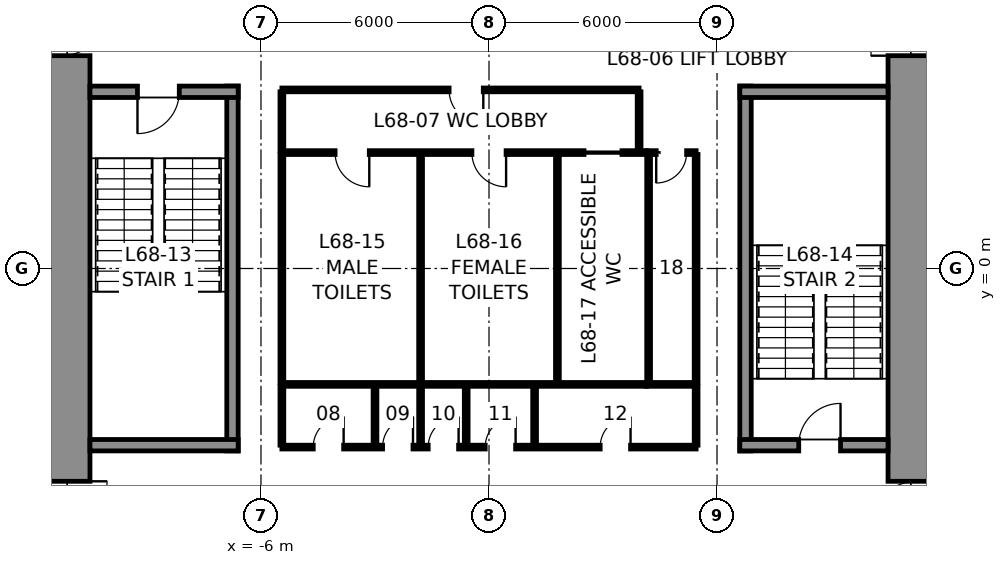
"""IFC4 building model, lengths in metres.
Left out: names, types, materials, properties, quantities, classifications, styles, units other than length and angle.
Written with IfcOpenShell. Run it as: python <this file> out.ifc"""

import sys

from ifc_helpers import new_model, si_unit, direction, frame, frame_2d, origin, place, context, subcontext, project, spatial, rectangle, extrude, element, fill, save


model = new_model("IFC4")
c1 = context("Model", 3, precision=1e-05, world=origin(), true_north=direction((0.0, 1.0)))
c2 = subcontext(c1, "Body", "Model", "MODEL_VIEW")
j1 = project(units=[si_unit("LENGTHUNIT", "METRE"), si_unit("PLANEANGLEUNIT", "RADIAN")], contexts=[c1])
p1 = place(None, origin())
s1 = spatial("IfcSite", under=j1, at=p1, CompositionType="ELEMENT")
p2 = place(p1, origin())
s2 = spatial("IfcBuilding", under=s1, at=p2, CompositionType="ELEMENT")
p3 = place(p2, frame((0.0, 0.0, 302.8)))
s3 = spatial("IfcBuildingStorey", under=s2, at=p3, CompositionType="ELEMENT", Elevation=302.8)
p4 = place(p3, frame((11.25, 10.5, 0.0), z_axis=(0.0, 0.0, 1.0), x_axis=(0.0, -1.0, 0.0)))
e1 = element("IfcWall", 1, at=p4, inside=s3, PredefinedType="SHEAR", context=c2, shape_type="SweptSolid", body=[
    extrude(rectangle(XDim=21.0, YDim=1.5, at=frame_2d((10.5, 0.0))), origin(), (0.0, 0.0, 1.0), 5.0),
])
p5 = place(p4, frame((3.7, 0.0, 0.0)))
e2 = element("IfcOpeningElement", 2, at=p5, cuts=e1, PredefinedType="OPENING", context=c2, shape_type="SweptSolid", body=[
    extrude(rectangle(XDim=1.2, YDim=2.3, at=frame_2d((0.6, 1.15))), frame((0.0, 0.76, 0.0), z_axis=(0.0, -1.0, 0.0), x_axis=(1.0, 0.0, 0.0)), (0.0, 0.0, 1.0), 1.52),
])
p6 = place(p4, frame((16.1, 0.0, 0.0)))
e3 = element("IfcOpeningElement", 3, at=p6, cuts=e1, PredefinedType="OPENING", context=c2, shape_type="SweptSolid", body=[
    extrude(rectangle(XDim=1.2, YDim=2.3, at=frame_2d((0.6, 1.15))), frame((0.0, 0.76, 0.0), z_axis=(0.0, -1.0, 0.0), x_axis=(1.0, 0.0, 0.0)), (0.0, 0.0, 1.0), 1.52),
])
p7 = place(p3, frame((-11.25, -10.5, 0.0), z_axis=(0.0, 0.0, 1.0), x_axis=(0.0, 1.0, 0.0)))
e4 = element("IfcWall", 4, at=p7, inside=s3, PredefinedType="SHEAR", context=c2, shape_type="SweptSolid", body=[
    extrude(rectangle(XDim=21.0, YDim=1.5, at=frame_2d((10.5, 0.0))), origin(), (0.0, 0.0, 1.0), 5.0),
])
p8 = place(p7, frame((16.1, 0.0, 0.0)))
e5 = element("IfcOpeningElement", 5, at=p8, cuts=e4, PredefinedType="OPENING", context=c2, shape_type="SweptSolid", body=[
    extrude(rectangle(XDim=1.2, YDim=2.3, at=frame_2d((0.6, 1.15))), frame((0.0, 0.76, 0.0), z_axis=(0.0, -1.0, 0.0), x_axis=(1.0, 0.0, 0.0)), (0.0, 0.0, 1.0), 1.52),
])
p9 = place(p7, frame((3.7, 0.0, 0.0)))
e6 = element("IfcOpeningElement", 6, at=p9, cuts=e4, PredefinedType="OPENING", context=c2, shape_type="SweptSolid", body=[
    extrude(rectangle(XDim=1.2, YDim=2.3, at=frame_2d((0.6, 1.15))), frame((0.0, 0.76, 0.0), z_axis=(0.0, -1.0, 0.0), x_axis=(1.0, 0.0, 0.0)), (0.0, 0.0, 1.0), 1.52),
])
p10 = place(p3, frame((-6.75, -4.8, 0.0), z_axis=(0.0, 0.0, 1.0), x_axis=(0.0, 1.0, 0.0)))
e7 = element("IfcWall", 7, at=p10, inside=s3, PredefinedType="SOLIDWALL", context=c2, shape_type="SweptSolid", body=[
    extrude(rectangle(XDim=9.6, YDim=0.3, at=frame_2d((4.8, 0.0))), origin(), (0.0, 0.0, 1.0), 4.75),
])
p11 = place(p3, frame((-10.5, 4.65, 0.0), z_axis=(0.0, 0.0, 1.0), x_axis=(1.0, 0.0, 0.0)))
e8 = element("IfcWall", 8, at=p11, inside=s3, PredefinedType="SOLIDWALL", context=c2, shape_type="SweptSolid", body=[
    extrude(rectangle(XDim=3.9, YDim=0.3, at=frame_2d((1.95, 0.0))), origin(), (0.0, 0.0, 1.0), 4.75),
])
p12 = place(p11, frame((1.25, 0.0, 0.0)))
e9 = element("IfcOpeningElement", 9, at=p12, cuts=e8, PredefinedType="OPENING", context=c2, shape_type="SweptSolid", body=[
    extrude(rectangle(XDim=1.1, YDim=2.3, at=frame_2d((0.55, 1.15))), frame((0.0, 0.16, 0.0), z_axis=(0.0, -1.0, 0.0), x_axis=(1.0, 0.0, 0.0)), (0.0, 0.0, 1.0), 0.32),
])
p13 = place(p3, frame((-6.6, -4.65, 0.0), z_axis=(0.0, 0.0, 1.0), x_axis=(-1.0, 0.0, 0.0)))
e10 = element("IfcWall", 10, at=p13, inside=s3, PredefinedType="SOLIDWALL", context=c2, shape_type="SweptSolid", body=[
    extrude(rectangle(XDim=3.9, YDim=0.3, at=frame_2d((1.95, 0.0))), origin(), (0.0, 0.0, 1.0), 4.75),
])
p14 = place(p3, frame((6.75, -4.8, 0.0), z_axis=(0.0, 0.0, 1.0), x_axis=(0.0, 1.0, 0.0)))
e11 = element("IfcWall", 11, at=p14, inside=s3, PredefinedType="SOLIDWALL", context=c2, shape_type="SweptSolid", body=[
    extrude(rectangle(XDim=9.6, YDim=0.3, at=frame_2d((4.8, 0.0))), origin(), (0.0, 0.0, 1.0), 4.75),
])
p15 = place(p3, frame((6.6, 4.65, 0.0), z_axis=(0.0, 0.0, 1.0), x_axis=(1.0, 0.0, 0.0)))
e12 = element("IfcWall", 12, at=p15, inside=s3, PredefinedType="SOLIDWALL", context=c2, shape_type="SweptSolid", body=[
    extrude(rectangle(XDim=3.9, YDim=0.3, at=frame_2d((1.95, 0.0))), origin(), (0.0, 0.0, 1.0), 4.75),
])
p16 = place(p3, frame((10.5, -4.65, 0.0), z_axis=(0.0, 0.0, 1.0), x_axis=(-1.0, 0.0, 0.0)))
e13 = element("IfcWall", 13, at=p16, inside=s3, PredefinedType="SOLIDWALL", context=c2, shape_type="SweptSolid", body=[
    extrude(rectangle(XDim=3.9, YDim=0.3, at=frame_2d((1.95, 0.0))), origin(), (0.0, 0.0, 1.0), 4.75),
])
p17 = place(p16, frame((1.25, 0.0, 0.0)))
e14 = element("IfcOpeningElement", 14, at=p17, cuts=e13, PredefinedType="OPENING", context=c2, shape_type="SweptSolid", body=[
    extrude(rectangle(XDim=1.1, YDim=2.3, at=frame_2d((0.55, 1.15))), frame((0.0, 0.16, 0.0), z_axis=(0.0, -1.0, 0.0), x_axis=(1.0, 0.0, 0.0)), (0.0, 0.0, 1.0), 0.32),
])
p18 = place(p3, frame((-5.45, 3.05, 0.0), z_axis=(0.0, 0.0, 1.0), x_axis=(1.0, 0.0, 0.0)))
e15 = element("IfcWall", 15, at=p18, inside=s3, PredefinedType="PARTITIONING", context=c2, shape_type="SweptSolid", body=[
    extrude(rectangle(XDim=9.6, YDim=0.1, at=frame_2d((4.8, 0.0))), origin(), (0.0, 0.0, 1.0), 4.75),
])
p19 = place(p18, frame((1.4, 0.0, 0.0)))
e16 = element("IfcOpeningElement", 16, at=p19, cuts=e15, PredefinedType="OPENING", context=c2, shape_type="SweptSolid", body=[
    extrude(rectangle(XDim=0.9, YDim=2.3, at=frame_2d((0.45, 1.15))), frame((0.0, 0.06, 0.0), z_axis=(0.0, -1.0, 0.0), x_axis=(1.0, 0.0, 0.0)), (0.0, 0.0, 1.0), 0.12),
])
p20 = place(p18, frame((5.0, 0.0, 0.0)))
e17 = element("IfcOpeningElement", 17, at=p20, cuts=e15, PredefinedType="OPENING", context=c2, shape_type="SweptSolid", body=[
    extrude(rectangle(XDim=0.9, YDim=2.3, at=frame_2d((0.45, 1.15))), frame((0.0, 0.06, 0.0), z_axis=(0.0, -1.0, 0.0), x_axis=(1.0, 0.0, 0.0)), (0.0, 0.0, 1.0), 0.12),
])
p21 = place(p18, frame((7.95, 0.0, 0.0)))
e18 = element("IfcOpeningElement", 18, at=p21, cuts=e15, PredefinedType="OPENING", context=c2, shape_type="SweptSolid", body=[
    extrude(rectangle(XDim=1.0, YDim=2.3, at=frame_2d((0.5, 1.15))), frame((0.0, 0.06, 0.0), z_axis=(0.0, -1.0, 0.0), x_axis=(1.0, 0.0, 0.0)), (0.0, 0.0, 1.0), 0.12),
])
p22 = place(p3, frame((4.15, 3.05, 0.0), z_axis=(0.0, 0.0, 1.0), x_axis=(1.0, 0.0, 0.0)))
e19 = element("IfcWall", 19, at=p22, inside=s3, PredefinedType="PARTITIONING", context=c2, shape_type="SweptSolid", body=[
    extrude(rectangle(XDim=1.3, YDim=0.1, at=frame_2d((0.65, 0.0))), origin(), (0.0, 0.0, 1.0), 4.75),
])
p23 = place(p22, frame((0.25, 0.0, 0.0)))
e20 = element("IfcOpeningElement", 20, at=p23, cuts=e19, PredefinedType="OPENING", context=c2, shape_type="SweptSolid", body=[
    extrude(rectangle(XDim=0.8, YDim=2.3, at=frame_2d((0.4, 1.15))), frame((0.0, 0.06, 0.0), z_axis=(0.0, -1.0, 0.0), x_axis=(1.0, 0.0, 0.0)), (0.0, 0.0, 1.0), 0.12),
])
p24 = place(p3, frame((4.15, -3.05, 0.0), z_axis=(0.0, 0.0, 1.0), x_axis=(-1.0, 0.0, 0.0)))
e21 = element("IfcWall", 21, at=p24, inside=s3, PredefinedType="PARTITIONING", context=c2, shape_type="SweptSolid", body=[
    extrude(rectangle(XDim=9.6, YDim=0.1, at=frame_2d((4.8, 0.0))), origin(), (0.0, 0.0, 1.0), 4.75),
])
p25 = place(p3, frame((5.45, -3.05, 0.0), z_axis=(0.0, 0.0, 1.0), x_axis=(-1.0, 0.0, 0.0)))
e22 = element("IfcWall", 22, at=p25, inside=s3, PredefinedType="PARTITIONING", context=c2, shape_type="SweptSolid", body=[
    extrude(rectangle(XDim=1.3, YDim=0.1, at=frame_2d((0.65, 0.0))), origin(), (0.0, 0.0, 1.0), 4.75),
])
for number, where, z_axis, x_axis in (
    (23, (5.45, 3.0, 0.0), (0.0, 0.0, 1.0), (0.0, -1.0, 0.0)),
    (24, (-5.45, -3.0, 0.0), (0.0, 0.0, 1.0), (0.0, 1.0, 0.0)),
    (25, (-1.8, -3.0, 0.0), (0.0, 0.0, 1.0), (0.0, 1.0, 0.0)),
    (26, (1.8, -3.0, 0.0), (0.0, 0.0, 1.0), (0.0, 1.0, 0.0)),
    (27, (4.2, -3.0, 0.0), (0.0, 0.0, 1.0), (0.0, 1.0, 0.0)),
):
    element("IfcWall", number, at=place(p3, frame(where, z_axis=z_axis, x_axis=x_axis)), inside=s3, PredefinedType="PARTITIONING", context=c2, shape_type="SweptSolid", body=[
        extrude(rectangle(XDim=6.0, YDim=0.1, at=frame_2d((3.0, 0.0))), origin(), (0.0, 0.0, 1.0), 4.75),
    ])
p26 = place(p3, frame((-5.45, 4.7, 0.0), z_axis=(0.0, 0.0, 1.0), x_axis=(1.0, 0.0, 0.0)))
e28 = element("IfcWall", 28, at=p26, inside=s3, PredefinedType="PARTITIONING", context=c2, shape_type="SweptSolid", body=[
    extrude(rectangle(XDim=9.4, YDim=0.1, at=frame_2d((4.7, 0.0))), origin(), (0.0, 0.0, 1.0), 4.75),
])
p27 = place(p26, frame((4.4, 0.0, 0.0)))
e29 = element("IfcOpeningElement", 29, at=p27, cuts=e28, PredefinedType="OPENING", context=c2, shape_type="SweptSolid", body=[
    extrude(rectangle(XDim=0.9, YDim=2.3, at=frame_2d((0.45, 1.15))), frame((0.0, 0.06, 0.0), z_axis=(0.0, -1.0, 0.0), x_axis=(1.0, 0.0, 0.0)), (0.0, 0.0, 1.0), 0.12),
])
for number, where, z_axis, x_axis in (
    (30, (-5.45, 3.1, 0.0), (0.0, 0.0, 1.0), (0.0, 1.0, 0.0)),
    (31, (3.95, 3.1, 0.0), (0.0, 0.0, 1.0), (0.0, 1.0, 0.0)),
):
    element("IfcWall", number, at=place(p3, frame(where, z_axis=z_axis, x_axis=x_axis)), inside=s3, PredefinedType="PARTITIONING", context=c2, shape_type="SweptSolid", body=[
        extrude(rectangle(XDim=1.55, YDim=0.1, at=frame_2d((0.775, 0.0))), origin(), (0.0, 0.0, 1.0), 4.75),
    ])
p28 = place(p3, frame((5.45, -4.7, 0.0), z_axis=(0.0, 0.0, 1.0), x_axis=(-1.0, 0.0, 0.0)))
e32 = element("IfcWall", 32, at=p28, inside=s3, PredefinedType="PARTITIONING", context=c2, shape_type="SweptSolid", body=[
    extrude(rectangle(XDim=10.9, YDim=0.1, at=frame_2d((5.45, 0.0))), origin(), (0.0, 0.0, 1.0), 4.75),
])
p29 = place(p28, frame((9.275, 0.0, 0.0)))
e33 = element("IfcOpeningElement", 33, at=p29, cuts=e32, PredefinedType="OPENING", context=c2, shape_type="SweptSolid", body=[
    extrude(rectangle(XDim=0.8, YDim=2.3, at=frame_2d((0.4, 1.15))), frame((0.0, 0.06, 0.0), z_axis=(0.0, -1.0, 0.0), x_axis=(1.0, 0.0, 0.0)), (0.0, 0.0, 1.0), 0.12),
])
p30 = place(p28, frame((7.45, 0.0, 0.0)))
e34 = element("IfcOpeningElement", 34, at=p30, cuts=e32, PredefinedType="OPENING", context=c2, shape_type="SweptSolid", body=[
    extrude(rectangle(XDim=0.8, YDim=2.3, at=frame_2d((0.4, 1.15))), frame((0.0, 0.06, 0.0), z_axis=(0.0, -1.0, 0.0), x_axis=(1.0, 0.0, 0.0)), (0.0, 0.0, 1.0), 0.12),
])
p31 = place(p28, frame((6.25, 0.0, 0.0)))
e35 = element("IfcOpeningElement", 35, at=p31, cuts=e32, PredefinedType="OPENING", context=c2, shape_type="SweptSolid", body=[
    extrude(rectangle(XDim=0.8, YDim=2.3, at=frame_2d((0.4, 1.15))), frame((0.0, 0.06, 0.0), z_axis=(0.0, -1.0, 0.0), x_axis=(1.0, 0.0, 0.0)), (0.0, 0.0, 1.0), 0.12),
])
p32 = place(p28, frame((4.75, 0.0, 0.0)))
e36 = element("IfcOpeningElement", 36, at=p32, cuts=e32, PredefinedType="OPENING", context=c2, shape_type="SweptSolid", body=[
    extrude(rectangle(XDim=0.8, YDim=2.3, at=frame_2d((0.4, 1.15))), frame((0.0, 0.06, 0.0), z_axis=(0.0, -1.0, 0.0), x_axis=(1.0, 0.0, 0.0)), (0.0, 0.0, 1.0), 0.12),
])
p33 = place(p28, frame((1.725, 0.0, 0.0)))
e37 = element("IfcOpeningElement", 37, at=p33, cuts=e32, PredefinedType="OPENING", context=c2, shape_type="SweptSolid", body=[
    extrude(rectangle(XDim=0.8, YDim=2.3, at=frame_2d((0.4, 1.15))), frame((0.0, 0.06, 0.0), z_axis=(0.0, -1.0, 0.0), x_axis=(1.0, 0.0, 0.0)), (0.0, 0.0, 1.0), 0.12),
])
for number, where, z_axis, x_axis in (
    (38, (-5.45, -3.1, 0.0), (0.0, 0.0, 1.0), (0.0, -1.0, 0.0)),
    (39, (5.45, -3.1, 0.0), (0.0, 0.0, 1.0), (0.0, -1.0, 0.0)),
    (40, (-3.0, -3.1, 0.0), (0.0, 0.0, 1.0), (0.0, -1.0, 0.0)),
    (41, (-1.8, -3.1, 0.0), (0.0, 0.0, 1.0), (0.0, -1.0, 0.0)),
    (42, (-0.6, -3.1, 0.0), (0.0, 0.0, 1.0), (0.0, -1.0, 0.0)),
    (43, (1.2, -3.1, 0.0), (0.0, 0.0, 1.0), (0.0, -1.0, 0.0)),
):
    element("IfcWall", number, at=place(p3, frame(where, z_axis=z_axis, x_axis=x_axis)), inside=s3, PredefinedType="PARTITIONING", context=c2, shape_type="SweptSolid", body=[
        extrude(rectangle(XDim=1.55, YDim=0.1, at=frame_2d((0.775, 0.0))), origin(), (0.0, 0.0, 1.0), 4.75),
    ])
p34 = place(p12, frame((1.1, 0.0, 0.0), z_axis=(0.0, 0.0, 1.0), x_axis=(-1.0, 0.0, 0.0)))
e44 = element("IfcDoor", 44, at=p34, inside=s3, OperationType="SINGLE_SWING_RIGHT", PredefinedType="DOOR", context=c2, shape_type="SweptSolid", body=[
    extrude(rectangle(XDim=1.1, YDim=2.3, at=frame_2d((0.55, 1.15))), frame((0.0, 0.025, 0.0), z_axis=(0.0, -1.0, 0.0), x_axis=(1.0, 0.0, 0.0)), (0.0, 0.0, 1.0), 0.05),
])
fill(e9, e44)
p35 = place(p17, frame((1.1, 0.0, 0.0), z_axis=(0.0, 0.0, 1.0), x_axis=(-1.0, 0.0, 0.0)))
e45 = element("IfcDoor", 45, at=p35, inside=s3, OperationType="SINGLE_SWING_RIGHT", PredefinedType="DOOR", context=c2, shape_type="SweptSolid", body=[
    extrude(rectangle(XDim=1.1, YDim=2.3, at=frame_2d((0.55, 1.15))), frame((0.0, 0.025, 0.0), z_axis=(0.0, -1.0, 0.0), x_axis=(1.0, 0.0, 0.0)), (0.0, 0.0, 1.0), 0.05),
])
fill(e14, e45)
p36 = place(p19, frame((0.9, 0.0, 0.0), z_axis=(0.0, 0.0, 1.0), x_axis=(-1.0, 0.0, 0.0)))
e46 = element("IfcDoor", 46, at=p36, inside=s3, OperationType="SINGLE_SWING_LEFT", PredefinedType="DOOR", context=c2, shape_type="SweptSolid", body=[
    extrude(rectangle(XDim=0.9, YDim=2.3, at=frame_2d((0.45, 1.15))), frame((0.0, 0.025, 0.0), z_axis=(0.0, -1.0, 0.0), x_axis=(1.0, 0.0, 0.0)), (0.0, 0.0, 1.0), 0.05),
])
fill(e16, e46)
p37 = place(p20, frame((0.9, 0.0, 0.0), z_axis=(0.0, 0.0, 1.0), x_axis=(-1.0, 0.0, 0.0)))
e47 = element("IfcDoor", 47, at=p37, inside=s3, OperationType="SINGLE_SWING_LEFT", PredefinedType="DOOR", context=c2, shape_type="SweptSolid", body=[
    extrude(rectangle(XDim=0.9, YDim=2.3, at=frame_2d((0.45, 1.15))), frame((0.0, 0.025, 0.0), z_axis=(0.0, -1.0, 0.0), x_axis=(1.0, 0.0, 0.0)), (0.0, 0.0, 1.0), 0.05),
])
fill(e17, e47)
p38 = place(p21, frame((1.0, 0.0, 0.0), z_axis=(0.0, 0.0, 1.0), x_axis=(-1.0, 0.0, 0.0)))
e48 = element("IfcDoor", 48, at=p38, inside=s3, OperationType="SLIDING_TO_LEFT", PredefinedType="DOOR", context=c2, shape_type="SweptSolid", body=[
    extrude(rectangle(XDim=1.0, YDim=2.3, at=frame_2d((0.5, 1.15))), frame((0.0, 0.025, 0.0), z_axis=(0.0, -1.0, 0.0), x_axis=(1.0, 0.0, 0.0)), (0.0, 0.0, 1.0), 0.05),
])
fill(e18, e48)
p39 = place(p23, frame((0.8, 0.0, 0.0), z_axis=(0.0, 0.0, 1.0), x_axis=(-1.0, 0.0, 0.0)))
e49 = element("IfcDoor", 49, at=p39, inside=s3, OperationType="SINGLE_SWING_RIGHT", PredefinedType="DOOR", context=c2, shape_type="SweptSolid", body=[
    extrude(rectangle(XDim=0.8, YDim=2.3, at=frame_2d((0.4, 1.15))), frame((0.0, 0.025, 0.0), z_axis=(0.0, -1.0, 0.0), x_axis=(1.0, 0.0, 0.0)), (0.0, 0.0, 1.0), 0.05),
])
fill(e20, e49)
p40 = place(p27, frame((0.9, 0.0, 0.0), z_axis=(0.0, 0.0, 1.0), x_axis=(-1.0, 0.0, 0.0)))
e50 = element("IfcDoor", 50, at=p40, inside=s3, OperationType="SINGLE_SWING_LEFT", PredefinedType="DOOR", context=c2, shape_type="SweptSolid", body=[
    extrude(rectangle(XDim=0.9, YDim=2.3, at=frame_2d((0.45, 1.15))), frame((0.0, 0.025, 0.0), z_axis=(0.0, -1.0, 0.0), x_axis=(1.0, 0.0, 0.0)), (0.0, 0.0, 1.0), 0.05),
])
fill(e29, e50)
p41 = place(p29, frame((0.8, 0.0, 0.0), z_axis=(0.0, 0.0, 1.0), x_axis=(-1.0, 0.0, 0.0)))
e51 = element("IfcDoor", 51, at=p41, inside=s3, OperationType="SINGLE_SWING_RIGHT", PredefinedType="DOOR", context=c2, shape_type="SweptSolid", body=[
    extrude(rectangle(XDim=0.8, YDim=2.3, at=frame_2d((0.4, 1.15))), frame((0.0, 0.025, 0.0), z_axis=(0.0, -1.0, 0.0), x_axis=(1.0, 0.0, 0.0)), (0.0, 0.0, 1.0), 0.05),
])
fill(e33, e51)
p42 = place(p30, frame((0.8, 0.0, 0.0), z_axis=(0.0, 0.0, 1.0), x_axis=(-1.0, 0.0, 0.0)))
e52 = element("IfcDoor", 52, at=p42, inside=s3, OperationType="SINGLE_SWING_RIGHT", PredefinedType="DOOR", context=c2, shape_type="SweptSolid", body=[
    extrude(rectangle(XDim=0.8, YDim=2.3, at=frame_2d((0.4, 1.15))), frame((0.0, 0.025, 0.0), z_axis=(0.0, -1.0, 0.0), x_axis=(1.0, 0.0, 0.0)), (0.0, 0.0, 1.0), 0.05),
])
fill(e34, e52)
p43 = place(p31, frame((0.8, 0.0, 0.0), z_axis=(0.0, 0.0, 1.0), x_axis=(-1.0, 0.0, 0.0)))
e53 = element("IfcDoor", 53, at=p43, inside=s3, OperationType="SINGLE_SWING_RIGHT", PredefinedType="DOOR", context=c2, shape_type="SweptSolid", body=[
    extrude(rectangle(XDim=0.8, YDim=2.3, at=frame_2d((0.4, 1.15))), frame((0.0, 0.025, 0.0), z_axis=(0.0, -1.0, 0.0), x_axis=(1.0, 0.0, 0.0)), (0.0, 0.0, 1.0), 0.05),
])
fill(e35, e53)
p44 = place(p32, frame((0.8, 0.0, 0.0), z_axis=(0.0, 0.0, 1.0), x_axis=(-1.0, 0.0, 0.0)))
e54 = element("IfcDoor", 54, at=p44, inside=s3, OperationType="SINGLE_SWING_RIGHT", PredefinedType="DOOR", context=c2, shape_type="SweptSolid", body=[
    extrude(rectangle(XDim=0.8, YDim=2.3, at=frame_2d((0.4, 1.15))), frame((0.0, 0.025, 0.0), z_axis=(0.0, -1.0, 0.0), x_axis=(1.0, 0.0, 0.0)), (0.0, 0.0, 1.0), 0.05),
])
fill(e36, e54)
p45 = place(p33, frame((0.8, 0.0, 0.0), z_axis=(0.0, 0.0, 1.0), x_axis=(-1.0, 0.0, 0.0)))
e55 = element("IfcDoor", 55, at=p45, inside=s3, OperationType="SINGLE_SWING_RIGHT", PredefinedType="DOOR", context=c2, shape_type="SweptSolid", body=[
    extrude(rectangle(XDim=0.8, YDim=2.3, at=frame_2d((0.4, 1.15))), frame((0.0, 0.025, 0.0), z_axis=(0.0, -1.0, 0.0), x_axis=(1.0, 0.0, 0.0)), (0.0, 0.0, 1.0), 0.05),
])
fill(e37, e55)
p46 = place(p8, frame((1.2, 0.0, 0.0), z_axis=(0.0, 0.0, 1.0), x_axis=(-1.0, 0.0, 0.0)))
e56 = element("IfcDoor", 56, at=p46, inside=s3, OperationType="SINGLE_SWING_LEFT", PredefinedType="DOOR", context=c2, shape_type="SweptSolid", body=[
    extrude(rectangle(XDim=1.2, YDim=2.3, at=frame_2d((0.6, 1.15))), frame((0.0, 0.025, 0.0), z_axis=(0.0, -1.0, 0.0), x_axis=(1.0, 0.0, 0.0)), (0.0, 0.0, 1.0), 0.05),
])
fill(e5, e56)
p47 = place(p9, frame((1.2, 0.0, 0.0), z_axis=(0.0, 0.0, 1.0), x_axis=(-1.0, 0.0, 0.0)))
e57 = element("IfcDoor", 57, at=p47, inside=s3, OperationType="SINGLE_SWING_LEFT", PredefinedType="DOOR", context=c2, shape_type="SweptSolid", body=[
    extrude(rectangle(XDim=1.2, YDim=2.3, at=frame_2d((0.6, 1.15))), frame((0.0, 0.025, 0.0), z_axis=(0.0, -1.0, 0.0), x_axis=(1.0, 0.0, 0.0)), (0.0, 0.0, 1.0), 0.05),
])
fill(e6, e57)
p48 = place(p5, frame((1.2, 0.0, 0.0), z_axis=(0.0, 0.0, 1.0), x_axis=(-1.0, 0.0, 0.0)))
e58 = element("IfcDoor", 58, at=p48, inside=s3, OperationType="SINGLE_SWING_LEFT", PredefinedType="DOOR", context=c2, shape_type="SweptSolid", body=[
    extrude(rectangle(XDim=1.2, YDim=2.3, at=frame_2d((0.6, 1.15))), frame((0.0, 0.025, 0.0), z_axis=(0.0, -1.0, 0.0), x_axis=(1.0, 0.0, 0.0)), (0.0, 0.0, 1.0), 0.05),
])
fill(e2, e58)
p49 = place(p6, frame((1.2, 0.0, 0.0), z_axis=(0.0, 0.0, 1.0), x_axis=(-1.0, 0.0, 0.0)))
e59 = element("IfcDoor", 59, at=p49, inside=s3, OperationType="SINGLE_SWING_LEFT", PredefinedType="DOOR", context=c2, shape_type="SweptSolid", body=[
    extrude(rectangle(XDim=1.2, YDim=2.3, at=frame_2d((0.6, 1.15))), frame((0.0, 0.025, 0.0), z_axis=(0.0, -1.0, 0.0), x_axis=(1.0, 0.0, 0.0)), (0.0, 0.0, 1.0), 0.05),
])
fill(e3, e59)
save(model, sys.argv[1])
